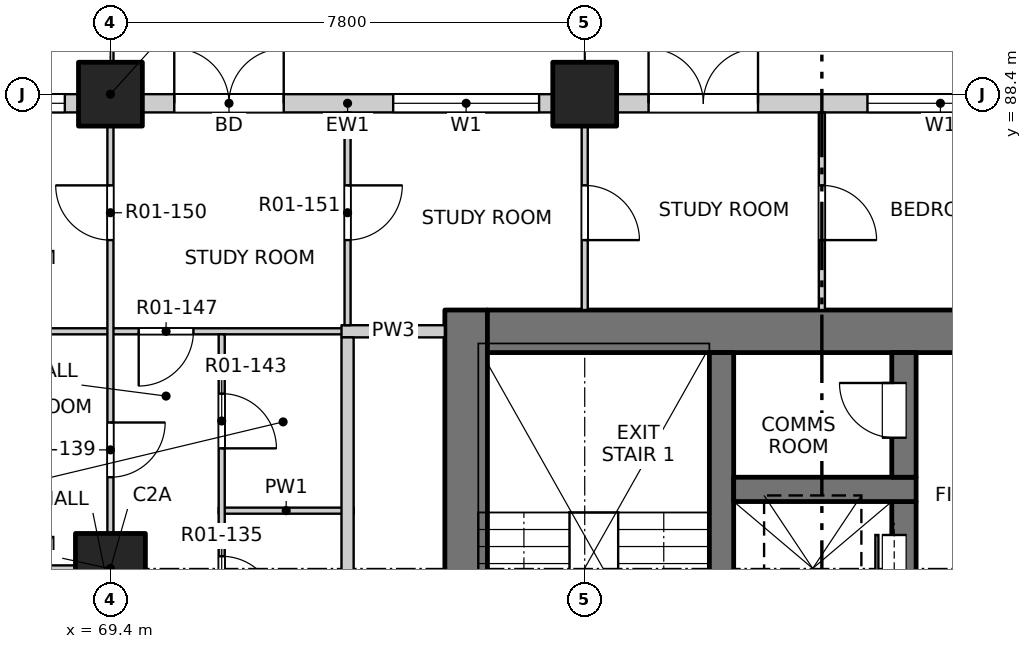
"""IFC4 building model, lengths in metres.
Left out: names, types, materials, properties, quantities, classifications, styles, units other than length and angle.
Written with IfcOpenShell. Run it as: python <this file> out.ifc"""

import sys

from ifc_helpers import new_model, si_unit, direction, frame, frame_2d, origin, origin_2d, place, context, subcontext, project, spatial, rectangle, extrude, element, fill, save


model = new_model("IFC4")
c1 = context("Model", 3, precision=1e-05, world=origin(), true_north=direction((0.0, 1.0)))
c2 = subcontext(c1, "Body", "Model", "MODEL_VIEW")
j1 = project(units=[si_unit("LENGTHUNIT", "METRE"), si_unit("PLANEANGLEUNIT", "RADIAN")], contexts=[c1])
p1 = place(None, origin())
s1 = spatial("IfcSite", under=j1, at=p1, CompositionType="ELEMENT")
p2 = place(p1, origin())
s2 = spatial("IfcBuilding", under=s1, at=p2, CompositionType="ELEMENT")
p3 = place(p2, frame((0.0, 0.0, 19.5)))
s3 = spatial("IfcBuildingStorey", under=s2, at=p3, CompositionType="ELEMENT", Elevation=19.5)
for number, where, z_axis, x_axis in (
    (1, (69.4, 88.4, -0.25), (0.0, 0.0, 1.0), (1.0, 0.0, 0.0)),
    (2, (77.2, 88.4, -0.25), (0.0, 0.0, 1.0), (1.0, 0.0, 0.0)),
):
    element("IfcColumn", number, at=place(p3, frame(where, z_axis=z_axis, x_axis=x_axis)), inside=s3, PredefinedType="COLUMN", context=c2, shape_type="SweptSolid", body=[
        extrude(rectangle(XDim=1.05, YDim=1.05, at=origin_2d()), origin(), (0.0, 0.0, 1.0), 3.4),
    ])
p4 = place(p3, frame((69.4, 80.6, -0.25), z_axis=(0.0, 0.0, 1.0), x_axis=(1.0, 0.0, 0.0)))
e3 = element("IfcColumn", 3, at=p4, inside=s3, PredefinedType="COLUMN", context=c2, shape_type="SweptSolid", body=[
    extrude(rectangle(XDim=1.15, YDim=1.15, at=origin_2d()), origin(), (0.0, 0.0, 1.0), 3.4),
])
p5 = place(p3, frame((75.25, 77.3, -0.25), z_axis=(0.0, 0.0, 1.0), x_axis=(0.0, 1.0, 0.0)))
e4 = element("IfcWall", 4, at=p5, inside=s3, PredefinedType="SOLIDWALL", context=c2, shape_type="SweptSolid", body=[
    extrude(rectangle(XDim=7.55, YDim=0.7, at=frame_2d((3.775, 0.0))), origin(), (0.0, 0.0, 1.0), 3.4),
])
p6 = place(p5, frame((0.3, 0.0, 0.25)))
e5 = element("IfcOpeningElement", 5, at=p6, cuts=e4, PredefinedType="OPENING", context=c2, shape_type="SweptSolid", body=[
    extrude(rectangle(XDim=1.2, YDim=2.1, at=frame_2d((0.6, 1.05))), frame((0.0, 0.36, 0.0), z_axis=(0.0, -1.0, 0.0), x_axis=(1.0, 0.0, 0.0)), (0.0, 0.0, 1.0), 0.72),
])
p7 = place(p3, frame((75.6, 84.5, -0.25), z_axis=(0.0, 0.0, 1.0), x_axis=(1.0, 0.0, 0.0)))
e6 = element("IfcWall", 6, at=p7, inside=s3, PredefinedType="SOLIDWALL", context=c2, shape_type="SweptSolid", body=[
    extrude(rectangle(XDim=18.8, YDim=0.7, at=frame_2d((9.4, 0.0))), origin(), (0.0, 0.0, 1.0), 3.4),
])
p8 = place(p3, frame((79.45, 77.3, -0.25), z_axis=(0.0, 0.0, 1.0), x_axis=(0.0, 1.0, 0.0)))
e7 = element("IfcWall", 7, at=p8, inside=s3, PredefinedType="SOLIDWALL", context=c2, shape_type="SweptSolid", body=[
    extrude(rectangle(XDim=6.85, YDim=0.4, at=frame_2d((3.425, 0.0))), origin(), (0.0, 0.0, 1.0), 3.4),
])
p9 = place(p3, frame((82.45, 79.5, -0.25), z_axis=(0.0, 0.0, 1.0), x_axis=(0.0, 1.0, 0.0)))
e8 = element("IfcWall", 8, at=p9, inside=s3, PredefinedType="SOLIDWALL", context=c2, shape_type="SweptSolid", body=[
    extrude(rectangle(XDim=2.2, YDim=0.4, at=frame_2d((1.1, 0.0))), origin(), (0.0, 0.0, 1.0), 3.4),
])
p10 = place(p9, frame((0.55, 0.0, 0.25)))
e9 = element("IfcOpeningElement", 9, at=p10, cuts=e8, PredefinedType="OPENING", context=c2, shape_type="SweptSolid", body=[
    extrude(rectangle(XDim=1.1, YDim=2.1, at=frame_2d((0.55, 1.05))), frame((0.0, 0.21, 0.0), z_axis=(0.0, -1.0, 0.0), x_axis=(1.0, 0.0, 0.0)), (0.0, 0.0, 1.0), 0.42),
])
p11 = place(p3, frame((79.65, 81.9, -0.25), z_axis=(0.0, 0.0, 1.0), x_axis=(1.0, 0.0, 0.0)))
e10 = element("IfcWall", 10, at=p11, inside=s3, PredefinedType="SOLIDWALL", context=c2, shape_type="SweptSolid", body=[
    extrude(rectangle(XDim=3.0, YDim=0.4, at=frame_2d((1.5, 0.0))), origin(), (0.0, 0.0, 1.0), 3.4),
])
p12 = place(p3, frame((82.45, 82.1, -0.25), z_axis=(0.0, 0.0, 1.0), x_axis=(0.0, 1.0, 0.0)))
e11 = element("IfcWall", 11, at=p12, inside=s3, PredefinedType="SOLIDWALL", context=c2, shape_type="SweptSolid", body=[
    extrude(rectangle(XDim=2.05, YDim=0.4, at=frame_2d((1.025, 0.0))), origin(), (0.0, 0.0, 1.0), 3.4),
])
p13 = place(p12, frame((0.65, 0.0, 0.25)))
e12 = element("IfcOpeningElement", 12, at=p13, cuts=e11, PredefinedType="OPENING", context=c2, shape_type="SweptSolid", body=[
    extrude(rectangle(XDim=0.9, YDim=2.1, at=frame_2d((0.45, 1.05))), frame((0.0, 0.21, 0.0), z_axis=(0.0, -1.0, 0.0), x_axis=(1.0, 0.0, 0.0)), (0.0, 0.0, 1.0), 0.42),
])
p14 = place(p3, frame((65.5, 88.25, 0.0), z_axis=(0.0, 0.0, 1.0), x_axis=(1.0, 0.0, 0.0)))
e13 = element("IfcWall", 13, at=p14, inside=s3, PredefinedType="SOLIDWALL", context=c2, shape_type="SweptSolid", body=[
    extrude(rectangle(XDim=3.375, YDim=0.3, at=frame_2d((1.688, 0.0))), origin(), (0.0, 0.0, 1.0), 2.7),
])
p15 = place(p14, frame((0.75, 0.0, 0.9)))
e14 = element("IfcOpeningElement", 14, at=p15, cuts=e13, PredefinedType="OPENING", context=c2, shape_type="SweptSolid", body=[
    extrude(rectangle(XDim=2.4, YDim=1.8, at=frame_2d((1.2, 0.9))), frame((0.0, 0.16, 0.0), z_axis=(0.0, -1.0, 0.0), x_axis=(1.0, 0.0, 0.0)), (0.0, 0.0, 1.0), 0.32),
])
p16 = place(p3, frame((69.925, 88.25, 0.0), z_axis=(0.0, 0.0, 1.0), x_axis=(1.0, 0.0, 0.0)))
e15 = element("IfcWall", 15, at=p16, inside=s3, PredefinedType="SOLIDWALL", context=c2, shape_type="SweptSolid", body=[
    extrude(rectangle(XDim=6.75, YDim=0.3, at=frame_2d((3.375, 0.0))), origin(), (0.0, 0.0, 1.0), 2.7),
])
p17 = place(p16, frame((0.525, 0.0, 0.0)))
e16 = element("IfcOpeningElement", 16, at=p17, cuts=e15, PredefinedType="OPENING", context=c2, shape_type="SweptSolid", body=[
    extrude(rectangle(XDim=1.8, YDim=2.4, at=frame_2d((0.9, 1.2))), frame((0.0, 0.16, 0.0), z_axis=(0.0, -1.0, 0.0), x_axis=(1.0, 0.0, 0.0)), (0.0, 0.0, 1.0), 0.32),
])
p18 = place(p16, frame((4.125, 0.0, 0.9)))
e17 = element("IfcOpeningElement", 17, at=p18, cuts=e15, PredefinedType="OPENING", context=c2, shape_type="SweptSolid", body=[
    extrude(rectangle(XDim=2.4, YDim=1.8, at=frame_2d((1.2, 0.9))), frame((0.0, 0.16, 0.0), z_axis=(0.0, -1.0, 0.0), x_axis=(1.0, 0.0, 0.0)), (0.0, 0.0, 1.0), 0.32),
])
p19 = place(p3, frame((77.725, 88.25, 0.0), z_axis=(0.0, 0.0, 1.0), x_axis=(1.0, 0.0, 0.0)))
e18 = element("IfcWall", 18, at=p19, inside=s3, PredefinedType="SOLIDWALL", context=c2, shape_type="SweptSolid", body=[
    extrude(rectangle(XDim=6.75, YDim=0.3, at=frame_2d((3.375, 0.0))), origin(), (0.0, 0.0, 1.0), 2.7),
])
p20 = place(p19, frame((0.525, 0.0, 0.0)))
e19 = element("IfcOpeningElement", 19, at=p20, cuts=e18, PredefinedType="OPENING", context=c2, shape_type="SweptSolid", body=[
    extrude(rectangle(XDim=1.8, YDim=2.4, at=frame_2d((0.9, 1.2))), frame((0.0, 0.16, 0.0), z_axis=(0.0, -1.0, 0.0), x_axis=(1.0, 0.0, 0.0)), (0.0, 0.0, 1.0), 0.32),
])
p21 = place(p19, frame((4.125, 0.0, 0.9)))
e20 = element("IfcOpeningElement", 20, at=p21, cuts=e18, PredefinedType="OPENING", context=c2, shape_type="SweptSolid", body=[
    extrude(rectangle(XDim=2.4, YDim=1.8, at=frame_2d((1.2, 0.9))), frame((0.0, 0.16, 0.0), z_axis=(0.0, -1.0, 0.0), x_axis=(1.0, 0.0, 0.0)), (0.0, 0.0, 1.0), 0.32),
])
p22 = place(p3, frame((61.9, 80.6, 0.0), z_axis=(0.0, 0.0, 1.0), x_axis=(1.0, 0.0, 0.0)))
e21 = element("IfcWall", 21, at=p22, inside=s3, PredefinedType="PARTITIONING", context=c2, shape_type="SweptSolid", body=[
    extrude(rectangle(XDim=7.55, YDim=0.1, at=frame_2d((3.775, 0.0))), origin(), (0.0, 0.0, 1.0), 2.55),
])
p23 = place(p3, frame((71.18, 81.55, 0.0), z_axis=(0.0, 0.0, 1.0), x_axis=(1.0, 0.0, 0.0)))
e22 = element("IfcWall", 22, at=p23, inside=s3, PredefinedType="PARTITIONING", context=c2, shape_type="SweptSolid", body=[
    extrude(rectangle(XDim=2.22, YDim=0.1, at=frame_2d((1.11, 0.0))), origin(), (0.0, 0.0, 1.0), 3.15),
])
p24 = place(p3, frame((61.9, 84.5, 0.0), z_axis=(0.0, 0.0, 1.0), x_axis=(1.0, 0.0, 0.0)))
e23 = element("IfcWall", 23, at=p24, inside=s3, PredefinedType="PARTITIONING", context=c2, shape_type="SweptSolid", body=[
    extrude(rectangle(XDim=11.5, YDim=0.1, at=frame_2d((5.75, 0.0))), origin(), (0.0, 0.0, 1.0), 3.15),
])
p25 = place(p24, frame((7.965, 0.0, 0.0)))
e24 = element("IfcOpeningElement", 24, at=p25, cuts=e23, PredefinedType="OPENING", context=c2, shape_type="SweptSolid", body=[
    extrude(rectangle(XDim=0.9, YDim=2.1, at=frame_2d((0.45, 1.05))), frame((0.0, 0.06, 0.0), z_axis=(0.0, -1.0, 0.0), x_axis=(1.0, 0.0, 0.0)), (0.0, 0.0, 1.0), 0.12),
])
p26 = place(p3, frame((73.2, 84.5, 0.0), z_axis=(0.0, 0.0, 1.0), x_axis=(1.0, 0.0, 0.0)))
e25 = element("IfcWall", 25, at=p26, inside=s3, PredefinedType="PARTITIONING", context=c2, shape_type="SweptSolid", body=[
    extrude(rectangle(XDim=1.7, YDim=0.2, at=frame_2d((0.85, 0.0))), origin(), (0.0, 0.0, 1.0), 3.15),
])
p27 = place(p3, frame((69.4, 80.6, 0.0), z_axis=(0.0, 0.0, 1.0), x_axis=(0.0, 1.0, 0.0)))
e26 = element("IfcWall", 26, at=p27, inside=s3, PredefinedType="PARTITIONING", context=c2, shape_type="SweptSolid", body=[
    extrude(rectangle(XDim=7.5, YDim=0.1, at=frame_2d((3.75, 0.0))), origin(), (0.0, 0.0, 1.0), 2.55),
])
p28 = place(p27, frame((1.5, 0.0, 0.0)))
e27 = element("IfcOpeningElement", 27, at=p28, cuts=e26, PredefinedType="OPENING", context=c2, shape_type="SweptSolid", body=[
    extrude(rectangle(XDim=0.9, YDim=2.1, at=frame_2d((0.45, 1.05))), frame((0.0, 0.06, 0.0), z_axis=(0.0, -1.0, 0.0), x_axis=(1.0, 0.0, 0.0)), (0.0, 0.0, 1.0), 0.12),
])
p29 = place(p27, frame((5.4, 0.0, 0.0)))
e28 = element("IfcOpeningElement", 28, at=p29, cuts=e26, PredefinedType="OPENING", context=c2, shape_type="SweptSolid", body=[
    extrude(rectangle(XDim=0.9, YDim=2.1, at=frame_2d((0.45, 1.05))), frame((0.0, 0.06, 0.0), z_axis=(0.0, -1.0, 0.0), x_axis=(1.0, 0.0, 0.0)), (0.0, 0.0, 1.0), 0.12),
])
p30 = place(p3, frame((71.23, 79.2, 0.0), z_axis=(0.0, 0.0, 1.0), x_axis=(0.0, 1.0, 0.0)))
e29 = element("IfcWall", 29, at=p30, inside=s3, PredefinedType="PARTITIONING", context=c2, shape_type="SweptSolid", body=[
    extrude(rectangle(XDim=5.25, YDim=0.1, at=frame_2d((2.625, 0.0))), origin(), (0.0, 0.0, 1.0), 3.15),
])
p31 = place(p30, frame((0.7, 0.0, 0.0)))
e30 = element("IfcOpeningElement", 30, at=p31, cuts=e29, PredefinedType="OPENING", context=c2, shape_type="SweptSolid", body=[
    extrude(rectangle(XDim=0.9, YDim=2.1, at=frame_2d((0.45, 1.05))), frame((0.0, 0.06, 0.0), z_axis=(0.0, -1.0, 0.0), x_axis=(1.0, 0.0, 0.0)), (0.0, 0.0, 1.0), 0.12),
])
p32 = place(p30, frame((3.375, 0.0, 0.0)))
e31 = element("IfcOpeningElement", 31, at=p32, cuts=e29, PredefinedType="OPENING", context=c2, shape_type="SweptSolid", body=[
    extrude(rectangle(XDim=0.9, YDim=2.1, at=frame_2d((0.45, 1.05))), frame((0.0, 0.06, 0.0), z_axis=(0.0, -1.0, 0.0), x_axis=(1.0, 0.0, 0.0)), (0.0, 0.0, 1.0), 0.12),
])
p33 = place(p3, frame((73.3, 53.4, 0.0), z_axis=(0.0, 0.0, 1.0), x_axis=(0.0, 1.0, 0.0)))
e32 = element("IfcWall", 32, at=p33, inside=s3, PredefinedType="PARTITIONING", context=c2, shape_type="SweptSolid", body=[
    extrude(rectangle(XDim=31.0, YDim=0.2, at=frame_2d((15.5, 0.0))), origin(), (0.0, 0.0, 1.0), 3.15),
])
p34 = place(p33, frame((2.325, 0.0, 0.0)))
e33 = element("IfcOpeningElement", 33, at=p34, cuts=e32, PredefinedType="OPENING", context=c2, shape_type="SweptSolid", body=[
    extrude(rectangle(XDim=1.0, YDim=2.1, at=frame_2d((0.5, 1.05))), frame((0.0, 0.11, 0.0), z_axis=(0.0, -1.0, 0.0), x_axis=(1.0, 0.0, 0.0)), (0.0, 0.0, 1.0), 0.22),
])
p35 = place(p33, frame((10.725, 0.0, 0.0)))
e34 = element("IfcOpeningElement", 34, at=p35, cuts=e32, PredefinedType="OPENING", context=c2, shape_type="SweptSolid", body=[
    extrude(rectangle(XDim=1.0, YDim=2.1, at=frame_2d((0.5, 1.05))), frame((0.0, 0.11, 0.0), z_axis=(0.0, -1.0, 0.0), x_axis=(1.0, 0.0, 0.0)), (0.0, 0.0, 1.0), 0.22),
])
p36 = place(p33, frame((18.225, 0.0, 0.0)))
e35 = element("IfcOpeningElement", 35, at=p36, cuts=e32, PredefinedType="OPENING", context=c2, shape_type="SweptSolid", body=[
    extrude(rectangle(XDim=1.0, YDim=2.1, at=frame_2d((0.5, 1.05))), frame((0.0, 0.11, 0.0), z_axis=(0.0, -1.0, 0.0), x_axis=(1.0, 0.0, 0.0)), (0.0, 0.0, 1.0), 0.22),
])
p37 = place(p33, frame((25.925, 0.0, 0.0)))
e36 = element("IfcOpeningElement", 36, at=p37, cuts=e32, PredefinedType="OPENING", context=c2, shape_type="SweptSolid", body=[
    extrude(rectangle(XDim=1.0, YDim=2.1, at=frame_2d((0.5, 1.05))), frame((0.0, 0.11, 0.0), z_axis=(0.0, -1.0, 0.0), x_axis=(1.0, 0.0, 0.0)), (0.0, 0.0, 1.0), 0.22),
])
p38 = place(p3, frame((73.3, 84.6, 0.0), z_axis=(0.0, 0.0, 1.0), x_axis=(0.0, 1.0, 0.0)))
e37 = element("IfcWall", 37, at=p38, inside=s3, PredefinedType="PARTITIONING", context=c2, shape_type="SweptSolid", body=[
    extrude(rectangle(XDim=3.5, YDim=0.1, at=frame_2d((1.75, 0.0))), origin(), (0.0, 0.0, 1.0), 3.15),
])
p39 = place(p38, frame((1.4, 0.0, 0.0)))
e38 = element("IfcOpeningElement", 38, at=p39, cuts=e37, PredefinedType="OPENING", context=c2, shape_type="SweptSolid", body=[
    extrude(rectangle(XDim=0.9, YDim=2.1, at=frame_2d((0.45, 1.05))), frame((0.0, 0.06, 0.0), z_axis=(0.0, -1.0, 0.0), x_axis=(1.0, 0.0, 0.0)), (0.0, 0.0, 1.0), 0.12),
])
p40 = place(p3, frame((77.2, 84.85, 0.0), z_axis=(0.0, 0.0, 1.0), x_axis=(0.0, 1.0, 0.0)))
e39 = element("IfcWall", 39, at=p40, inside=s3, PredefinedType="PARTITIONING", context=c2, shape_type="SweptSolid", body=[
    extrude(rectangle(XDim=3.25, YDim=0.1, at=frame_2d((1.625, 0.0))), origin(), (0.0, 0.0, 1.0), 3.15),
])
p41 = place(p40, frame((1.15, 0.0, 0.0)))
e40 = element("IfcOpeningElement", 40, at=p41, cuts=e39, PredefinedType="OPENING", context=c2, shape_type="SweptSolid", body=[
    extrude(rectangle(XDim=0.9, YDim=2.1, at=frame_2d((0.45, 1.05))), frame((0.0, 0.06, 0.0), z_axis=(0.0, -1.0, 0.0), x_axis=(1.0, 0.0, 0.0)), (0.0, 0.0, 1.0), 0.12),
])
p42 = place(p3, frame((81.1, 84.85, 0.0), z_axis=(0.0, 0.0, 1.0), x_axis=(0.0, 1.0, 0.0)))
e41 = element("IfcWall", 41, at=p42, inside=s3, PredefinedType="PARTITIONING", context=c2, shape_type="SweptSolid", body=[
    extrude(rectangle(XDim=3.25, YDim=0.1, at=frame_2d((1.625, 0.0))), origin(), (0.0, 0.0, 1.0), 3.15),
])
p43 = place(p42, frame((1.15, 0.0, 0.0)))
e42 = element("IfcOpeningElement", 42, at=p43, cuts=e41, PredefinedType="OPENING", context=c2, shape_type="SweptSolid", body=[
    extrude(rectangle(XDim=0.9, YDim=2.1, at=frame_2d((0.45, 1.05))), frame((0.0, 0.06, 0.0), z_axis=(0.0, -1.0, 0.0), x_axis=(1.0, 0.0, 0.0)), (0.0, 0.0, 1.0), 0.12),
])
p44 = place(p15, origin())
e43 = element("IfcWindow", 43, at=p44, inside=s3, PartitioningType="DOUBLE_PANEL_VERTICAL", PredefinedType="WINDOW", context=c2, shape_type="SweptSolid", body=[
    extrude(rectangle(XDim=2.4, YDim=1.8, at=frame_2d((1.2, 0.9))), frame((0.0, 0.03, 0.0), z_axis=(0.0, -1.0, 0.0), x_axis=(1.0, 0.0, 0.0)), (0.0, 0.0, 1.0), 0.06),
])
fill(e14, e43)
p45 = place(p17, origin())
e44 = element("IfcDoor", 44, at=p45, inside=s3, OperationType="DOUBLE_DOOR_SINGLE_SWING", PredefinedType="DOOR", context=c2, shape_type="SweptSolid", body=[
    extrude(rectangle(XDim=1.8, YDim=2.4, at=frame_2d((0.9, 1.2))), frame((0.0, 0.025, 0.0), z_axis=(0.0, -1.0, 0.0), x_axis=(1.0, 0.0, 0.0)), (0.0, 0.0, 1.0), 0.05),
])
fill(e16, e44)
p46 = place(p18, origin())
e45 = element("IfcWindow", 45, at=p46, inside=s3, PartitioningType="DOUBLE_PANEL_VERTICAL", PredefinedType="WINDOW", context=c2, shape_type="SweptSolid", body=[
    extrude(rectangle(XDim=2.4, YDim=1.8, at=frame_2d((1.2, 0.9))), frame((0.0, 0.03, 0.0), z_axis=(0.0, -1.0, 0.0), x_axis=(1.0, 0.0, 0.0)), (0.0, 0.0, 1.0), 0.06),
])
fill(e17, e45)
p47 = place(p20, origin())
e46 = element("IfcDoor", 46, at=p47, inside=s3, OperationType="DOUBLE_DOOR_SINGLE_SWING", PredefinedType="DOOR", context=c2, shape_type="SweptSolid", body=[
    extrude(rectangle(XDim=1.8, YDim=2.4, at=frame_2d((0.9, 1.2))), frame((0.0, 0.025, 0.0), z_axis=(0.0, -1.0, 0.0), x_axis=(1.0, 0.0, 0.0)), (0.0, 0.0, 1.0), 0.05),
])
fill(e19, e46)
p48 = place(p21, origin())
e47 = element("IfcWindow", 47, at=p48, inside=s3, PartitioningType="DOUBLE_PANEL_VERTICAL", PredefinedType="WINDOW", context=c2, shape_type="SweptSolid", body=[
    extrude(rectangle(XDim=2.4, YDim=1.8, at=frame_2d((1.2, 0.9))), frame((0.0, 0.03, 0.0), z_axis=(0.0, -1.0, 0.0), x_axis=(1.0, 0.0, 0.0)), (0.0, 0.0, 1.0), 0.06),
])
fill(e20, e47)
p49 = place(p31, origin())
e48 = element("IfcDoor", 48, at=p49, inside=s3, OperationType="SINGLE_SWING_RIGHT", PredefinedType="DOOR", context=c2, shape_type="SweptSolid", body=[
    extrude(rectangle(XDim=0.9, YDim=2.1, at=frame_2d((0.45, 1.05))), frame((0.0, 0.025, 0.0), z_axis=(0.0, -1.0, 0.0), x_axis=(1.0, 0.0, 0.0)), (0.0, 0.0, 1.0), 0.05),
])
fill(e30, e48)
p50 = place(p10, origin())
e49 = element("IfcDoor", 49, at=p50, inside=s3, OperationType="SLIDING_TO_LEFT", PredefinedType="DOOR", context=c2, shape_type="SweptSolid", body=[
    extrude(rectangle(XDim=1.1, YDim=2.1, at=frame_2d((0.55, 1.05))), frame((0.0, 0.185, 0.0), z_axis=(0.0, -1.0, 0.0), x_axis=(1.0, 0.0, 0.0)), (0.0, 0.0, 1.0), 0.05),
])
fill(e9, e49)
p51 = place(p28, origin())
e50 = element("IfcDoor", 50, at=p51, inside=s3, OperationType="SINGLE_SWING_LEFT", PredefinedType="DOOR", context=c2, shape_type="SweptSolid", body=[
    extrude(rectangle(XDim=0.9, YDim=2.1, at=frame_2d((0.45, 1.05))), frame((0.0, 0.025, 0.0), z_axis=(0.0, -1.0, 0.0), x_axis=(1.0, 0.0, 0.0)), (0.0, 0.0, 1.0), 0.05),
])
fill(e27, e50)
p52 = place(p32, origin())
e51 = element("IfcDoor", 51, at=p52, inside=s3, OperationType="SINGLE_SWING_RIGHT", PredefinedType="DOOR", context=c2, shape_type="SweptSolid", body=[
    extrude(rectangle(XDim=0.9, YDim=2.1, at=frame_2d((0.45, 1.05))), frame((0.0, 0.025, 0.0), z_axis=(0.0, -1.0, 0.0), x_axis=(1.0, 0.0, 0.0)), (0.0, 0.0, 1.0), 0.05),
])
fill(e31, e51)
p53 = place(p13, origin())
e52 = element("IfcDoor", 52, at=p53, inside=s3, OperationType="SINGLE_SWING_RIGHT", PredefinedType="DOOR", context=c2, shape_type="SweptSolid", body=[
    extrude(rectangle(XDim=0.9, YDim=2.1, at=frame_2d((0.45, 1.05))), frame((0.0, 0.185, 0.0), z_axis=(0.0, -1.0, 0.0), x_axis=(1.0, 0.0, 0.0)), (0.0, 0.0, 1.0), 0.05),
])
fill(e12, e52)
p54 = place(p25, origin())
e53 = element("IfcDoor", 53, at=p54, inside=s3, OperationType="SINGLE_SWING_RIGHT", PredefinedType="DOOR", context=c2, shape_type="SweptSolid", body=[
    extrude(rectangle(XDim=0.9, YDim=2.1, at=frame_2d((0.45, 1.05))), frame((0.0, 0.025, 0.0), z_axis=(0.0, -1.0, 0.0), x_axis=(1.0, 0.0, 0.0)), (0.0, 0.0, 1.0), 0.05),
])
fill(e24, e53)
p55 = place(p29, origin())
e54 = element("IfcDoor", 54, at=p55, inside=s3, OperationType="SINGLE_SWING_RIGHT", PredefinedType="DOOR", context=c2, shape_type="SweptSolid", body=[
    extrude(rectangle(XDim=0.9, YDim=2.1, at=frame_2d((0.45, 1.05))), frame((0.0, 0.025, 0.0), z_axis=(0.0, -1.0, 0.0), x_axis=(1.0, 0.0, 0.0)), (0.0, 0.0, 1.0), 0.05),
])
fill(e28, e54)
p56 = place(p39, origin())
e55 = element("IfcDoor", 55, at=p56, inside=s3, OperationType="SINGLE_SWING_LEFT", PredefinedType="DOOR", context=c2, shape_type="SweptSolid", body=[
    extrude(rectangle(XDim=0.9, YDim=2.1, at=frame_2d((0.45, 1.05))), frame((0.0, 0.025, 0.0), z_axis=(0.0, -1.0, 0.0), x_axis=(1.0, 0.0, 0.0)), (0.0, 0.0, 1.0), 0.05),
])
fill(e38, e55)
p57 = place(p41, origin())
e56 = element("IfcDoor", 56, at=p57, inside=s3, OperationType="SINGLE_SWING_RIGHT", PredefinedType="DOOR", context=c2, shape_type="SweptSolid", body=[
    extrude(rectangle(XDim=0.9, YDim=2.1, at=frame_2d((0.45, 1.05))), frame((0.0, 0.025, 0.0), z_axis=(0.0, -1.0, 0.0), x_axis=(1.0, 0.0, 0.0)), (0.0, 0.0, 1.0), 0.05),
])
fill(e40, e56)
p58 = place(p43, origin())
e57 = element("IfcDoor", 57, at=p58, inside=s3, OperationType="SINGLE_SWING_RIGHT", PredefinedType="DOOR", context=c2, shape_type="SweptSolid", body=[
    extrude(rectangle(XDim=0.9, YDim=2.1, at=frame_2d((0.45, 1.05))), frame((0.0, 0.025, 0.0), z_axis=(0.0, -1.0, 0.0), x_axis=(1.0, 0.0, 0.0)), (0.0, 0.0, 1.0), 0.05),
])
fill(e42, e57)
save(model, sys.argv[1])
